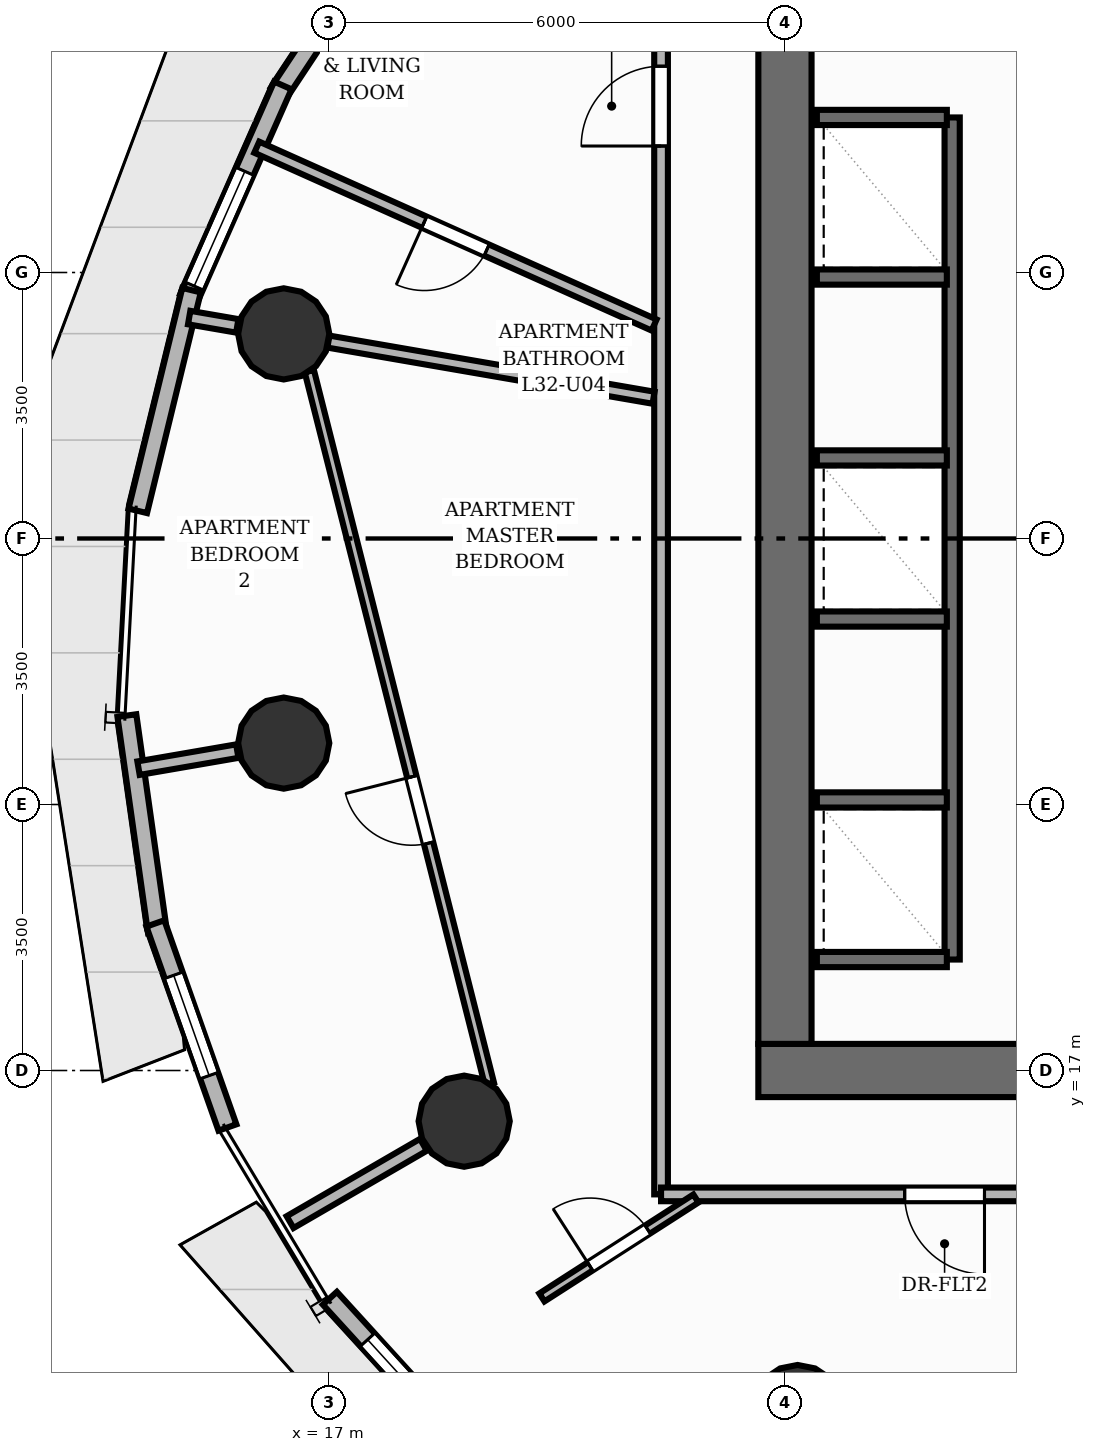
"""IFC4 building model, lengths in metres.
Left out: names, types, materials, properties, quantities, classifications, styles, units other than length and angle.
Written with IfcOpenShell. Run it as: python <this file> out.ifc"""

import sys

from ifc_helpers import new_model, si_unit, direction, frame, frame_2d, origin, origin_2d, place, context, subcontext, project, spatial, rectangle, circle, extrude, element, fill, save


model = new_model("IFC4")
c1 = context("Model", 3, precision=1e-05, world=origin(), true_north=direction((0.0, 1.0)))
c2 = subcontext(c1, "Body", "Model", "MODEL_VIEW")
j1 = project(units=[si_unit("LENGTHUNIT", "METRE"), si_unit("PLANEANGLEUNIT", "RADIAN")], contexts=[c1])
p1 = place(None, origin())
s1 = spatial("IfcSite", under=j1, at=p1, CompositionType="ELEMENT")
p2 = place(p1, origin())
s2 = spatial("IfcBuilding", under=s1, at=p2, CompositionType="ELEMENT")
p3 = place(p2, frame((0.0, 0.0, 109.28)))
s3 = spatial("IfcBuildingStorey", under=s2, at=p3, CompositionType="ELEMENT", Elevation=109.28)
p4 = place(p3, frame((22.65, 17.0, 0.0), z_axis=(0.0, 0.0, 1.0), x_axis=(1.0, 0.0, 0.0)))
e1 = element("IfcWall", 1, at=p4, inside=s3, PredefinedType="SHEAR", context=c2, shape_type="SweptSolid", body=[
    extrude(rectangle(XDim=18.7, YDim=0.7, at=frame_2d((9.35, 0.0))), origin(), (0.0, 0.0, 1.0), 3.2),
])
p5 = place(p4, frame((5.85, 0.0, 0.0)))
e2 = element("IfcOpeningElement", 2, at=p5, cuts=e1, PredefinedType="OPENING", context=c2, shape_type="SweptSolid", body=[
    extrude(rectangle(XDim=1.1, YDim=2.15, at=frame_2d((0.55, 1.075))), frame((0.0, 0.36, 0.0), z_axis=(0.0, -1.0, 0.0), x_axis=(1.0, 0.0, 0.0)), (0.0, 0.0, 1.0), 0.72),
])
p6 = place(p4, frame((9.4, 0.0, 0.0)))
e3 = element("IfcOpeningElement", 3, at=p6, cuts=e1, PredefinedType="OPENING", context=c2, shape_type="SweptSolid", body=[
    extrude(rectangle(XDim=0.9, YDim=2.0, at=frame_2d((0.45, 1.0))), frame((0.0, 0.36, 0.0), z_axis=(0.0, -1.0, 0.0), x_axis=(1.0, 0.0, 0.0)), (0.0, 0.0, 1.0), 0.72),
])
p7 = place(p3, frame((23.0, 17.35, 0.0), z_axis=(0.0, 0.0, 1.0), x_axis=(0.0, 1.0, 0.0)))
e4 = element("IfcWall", 4, at=p7, inside=s3, PredefinedType="SHEAR", context=c2, shape_type="SweptSolid", body=[
    extrude(rectangle(XDim=13.3, YDim=0.7, at=frame_2d((6.65, 0.0))), origin(), (0.0, 0.0, 1.0), 3.2),
])
for number, where, z_axis, x_axis in (
    (5, (16.406, 26.692, 0.0), (0.0, 0.0, 1.0), (1.0, 0.0, 0.0)),
    (6, (16.406, 21.308, 0.0), (0.0, 0.0, 1.0), (1.0, 0.0, 0.0)),
    (7, (18.78, 16.333, 0.0), (0.0, 0.0, 1.0), (1.0, 0.0, 0.0)),
    (8, (23.167, 12.526, 0.0), (0.0, 0.0, 1.0), (1.0, 0.0, 0.0)),
):
    element("IfcColumn", number, at=place(p3, frame(where, z_axis=z_axis, x_axis=x_axis)), inside=s3, PredefinedType="COLUMN", context=c2, shape_type="SweptSolid", body=[
        extrude(circle(Radius=0.6, at=origin_2d()), origin(), (0.0, 0.0, 1.0), 3.2),
    ])
p8 = place(p3, frame((16.341, 29.864, 0.0), z_axis=(0.0, 0.0, 1.0), x_axis=(0.552034347266, 0.833821371421, 0.0)))
e9 = element("IfcWall", 9, at=p8, inside=s3, PredefinedType="SOLIDWALL", context=c2, shape_type="SweptSolid", body=[
    extrude(rectangle(XDim=3.131, YDim=0.25, at=frame_2d((1.565, 0.0))), origin(), (0.0, 0.0, 1.0), 2.8),
])
p9 = place(p3, frame((15.157, 27.162, 0.0), z_axis=(0.0, 0.0, 1.0), x_axis=(0.404109525311, 0.914710605357, 0.0)))
e10 = element("IfcWall", 10, at=p9, inside=s3, PredefinedType="SOLIDWALL", context=c2, shape_type="SweptSolid", body=[
    extrude(rectangle(XDim=3.061, YDim=0.25, at=frame_2d((1.53, 0.0))), origin(), (0.0, 0.0, 1.0), 2.8),
])
p10 = place(p9, frame((0.175, 0.0, 0.85)))
e11 = element("IfcOpeningElement", 11, at=p10, cuts=e10, PredefinedType="OPENING", context=c2, shape_type="SweptSolid", body=[
    extrude(rectangle(XDim=1.65, YDim=1.55, at=frame_2d((0.825, 0.775))), frame((0.0, 0.135, 0.0), z_axis=(0.0, -1.0, 0.0), x_axis=(1.0, 0.0, 0.0)), (0.0, 0.0, 1.0), 0.27),
])
p11 = place(p3, frame((14.486, 24.364, 0.0), z_axis=(0.0, 0.0, 1.0), x_axis=(0.236668427837, 0.971590477138, 0.0)))
e12 = element("IfcWall", 12, at=p11, inside=s3, PredefinedType="SOLIDWALL", context=c2, shape_type="SweptSolid", body=[
    extrude(rectangle(XDim=2.989, YDim=0.25, at=frame_2d((1.494, 0.0))), origin(), (0.0, 0.0, 1.0), 2.8),
])
p12 = place(p3, frame((14.744, 18.824, 0.0), z_axis=(0.0, 0.0, 1.0), x_axis=(-0.139982311006, 0.990154004489, 0.0)))
e13 = element("IfcWall", 13, at=p12, inside=s3, PredefinedType="SOLIDWALL", context=c2, shape_type="SweptSolid", body=[
    extrude(rectangle(XDim=2.874, YDim=0.25, at=frame_2d((1.437, 0.0))), origin(), (0.0, 0.0, 1.0), 2.8),
])
p13 = place(p3, frame((15.665, 16.25, 0.0), z_axis=(0.0, 0.0, 1.0), x_axis=(-0.332923265962, 0.942953921982, 0.0)))
e14 = element("IfcWall", 14, at=p13, inside=s3, PredefinedType="SOLIDWALL", context=c2, shape_type="SweptSolid", body=[
    extrude(rectangle(XDim=2.847, YDim=0.25, at=frame_2d((1.424, 0.0))), origin(), (0.0, 0.0, 1.0), 2.8),
])
p14 = place(p13, frame((0.724, 0.0, 0.85)))
e15 = element("IfcOpeningElement", 15, at=p14, cuts=e14, PredefinedType="OPENING", context=c2, shape_type="SweptSolid", body=[
    extrude(rectangle(XDim=1.4, YDim=1.55, at=frame_2d((0.7, 0.775))), frame((0.0, 0.135, 0.0), z_axis=(0.0, -1.0, 0.0), x_axis=(1.0, 0.0, 0.0)), (0.0, 0.0, 1.0), 0.27),
])
p15 = place(p3, frame((18.949, 11.879, 0.0), z_axis=(0.0, 0.0, 1.0), x_axis=(-0.673691100196, 0.739013059098, 0.0)))
e16 = element("IfcWall", 16, at=p15, inside=s3, PredefinedType="SOLIDWALL", context=c2, shape_type="SweptSolid", body=[
    extrude(rectangle(XDim=2.874, YDim=0.25, at=frame_2d((1.437, 0.0))), origin(), (0.0, 0.0, 1.0), 2.8),
])
p16 = place(p15, frame((0.737, 0.0, 0.85)))
e17 = element("IfcOpeningElement", 17, at=p16, cuts=e16, PredefinedType="OPENING", context=c2, shape_type="SweptSolid", body=[
    extrude(rectangle(XDim=1.4, YDim=1.55, at=frame_2d((0.7, 0.775))), frame((0.0, 0.135, 0.0), z_axis=(0.0, -1.0, 0.0), x_axis=(1.0, 0.0, 0.0)), (0.0, 0.0, 1.0), 0.27),
])
p17 = place(p3, frame((25.2, 18.46, 0.0), z_axis=(0.0, 0.0, 1.0), x_axis=(0.0, 1.0, 0.0)))
e18 = element("IfcWall", 18, at=p17, inside=s3, PredefinedType="SHEAR", context=c2, shape_type="SweptSolid", body=[
    extrude(rectangle(XDim=11.08, YDim=0.2, at=frame_2d((5.54, 0.0))), origin(), (0.0, 0.0, 1.0), 3.2),
])
for number, where, z_axis, x_axis in (
    (19, (23.42, 18.46, 0.0), (0.0, 0.0, 1.0), (1.0, 0.0, 0.0)),
    (20, (23.42, 29.54, 0.0), (0.0, 0.0, 1.0), (1.0, 0.0, 0.0)),
    (21, (23.42, 20.56, 0.0), (0.0, 0.0, 1.0), (1.0, 0.0, 0.0)),
    (22, (23.42, 22.94, 0.0), (0.0, 0.0, 1.0), (1.0, 0.0, 0.0)),
    (23, (23.42, 25.06, 0.0), (0.0, 0.0, 1.0), (1.0, 0.0, 0.0)),
    (24, (23.42, 27.44, 0.0), (0.0, 0.0, 1.0), (1.0, 0.0, 0.0)),
):
    element("IfcWall", number, at=place(p3, frame(where, z_axis=z_axis, x_axis=x_axis)), inside=s3, PredefinedType="SHEAR", context=c2, shape_type="SweptSolid", body=[
        extrude(rectangle(XDim=1.71, YDim=0.2, at=frame_2d((0.855, 0.0))), origin(), (0.0, 0.0, 1.0), 3.2),
    ])
p18 = place(p3, frame((15.794, 26.798, 0.0), z_axis=(0.0, 0.0, 1.0), x_axis=(-0.985389793052, 0.170314285219, 0.0)))
e25 = element("IfcWall", 25, at=p18, inside=s3, PredefinedType="PARTITIONING", context=c2, shape_type="SweptSolid", body=[
    extrude(rectangle(XDim=0.642, YDim=0.18, at=frame_2d((0.321, 0.0))), origin(), (0.0, 0.0, 1.0), 2.1),
])
p19 = place(p3, frame((15.794, 21.202, 0.0), z_axis=(0.0, 0.0, 1.0), x_axis=(-0.98541625201, -0.170161130326, 0.0)))
e26 = element("IfcWall", 26, at=p19, inside=s3, PredefinedType="PARTITIONING", context=c2, shape_type="SweptSolid", body=[
    extrude(rectangle(XDim=1.319, YDim=0.18, at=frame_2d((0.659, 0.0))), origin(), (0.0, 0.0, 1.0), 2.1),
])
p20 = place(p3, frame((18.243, 16.022, 0.0), z_axis=(0.0, 0.0, 1.0), x_axis=(-0.865046864493, -0.501691062539, 0.0)))
e27 = element("IfcWall", 27, at=p20, inside=s3, PredefinedType="PARTITIONING", context=c2, shape_type="SweptSolid", body=[
    extrude(rectangle(XDim=2.028, YDim=0.18, at=frame_2d((1.014, 0.0))), origin(), (0.0, 0.0, 1.0), 2.1),
])
p21 = place(p3, frame((21.37, 15.37, 0.0), z_axis=(0.0, 0.0, 1.0), x_axis=(0.0, 1.0, 0.0)))
e28 = element("IfcWall", 28, at=p21, inside=s3, PredefinedType="PARTITIONING", context=c2, shape_type="SweptSolid", body=[
    extrude(rectangle(XDim=17.26, YDim=0.18, at=frame_2d((8.63, 0.0))), origin(), (0.0, 0.0, 1.0), 2.795),
])
p22 = place(p21, frame((13.794, 0.0, 0.0)))
e29 = element("IfcOpeningElement", 29, at=p22, cuts=e28, PredefinedType="OPENING", context=c2, shape_type="SweptSolid", body=[
    extrude(rectangle(XDim=1.05, YDim=2.0, at=frame_2d((0.525, 1.0))), frame((0.0, 0.1, 0.0), z_axis=(0.0, -1.0, 0.0), x_axis=(1.0, 0.0, 0.0)), (0.0, 0.0, 1.0), 0.2),
])
p23 = place(p3, frame((28.325, 15.37, 0.0), z_axis=(0.0, 0.0, 1.0), x_axis=(-1.0, 0.0, 0.0)))
e30 = element("IfcWall", 30, at=p23, inside=s3, PredefinedType="PARTITIONING", context=c2, shape_type="SweptSolid", body=[
    extrude(rectangle(XDim=6.955, YDim=0.18, at=frame_2d((3.478, 0.0))), origin(), (0.0, 0.0, 1.0), 2.795),
])
p24 = place(p23, frame((2.7, 0.0, 0.0)))
e31 = element("IfcOpeningElement", 31, at=p24, cuts=e30, PredefinedType="OPENING", context=c2, shape_type="SweptSolid", body=[
    extrude(rectangle(XDim=1.05, YDim=2.0, at=frame_2d((0.525, 1.0))), frame((0.0, 0.1, 0.0), z_axis=(0.0, -1.0, 0.0), x_axis=(1.0, 0.0, 0.0)), (0.0, 0.0, 1.0), 0.2),
])
p25 = place(p3, frame((21.279, 26.809, 0.0), z_axis=(0.0, 0.0, 1.0), x_axis=(-0.912794415037, 0.408419338275, 0.0)))
e32 = element("IfcWall", 32, at=p25, inside=s3, PredefinedType="PLUMBINGWALL", context=c2, shape_type="SweptSolid", body=[
    extrude(rectangle(XDim=5.727, YDim=0.16, at=frame_2d((2.864, 0.0))), origin(), (0.0, 0.0, 1.0), 2.481),
])
p26 = place(p25, frame((2.414, 0.0, 0.0)))
e33 = element("IfcOpeningElement", 33, at=p26, cuts=e32, PredefinedType="OPENING", context=c2, shape_type="SweptSolid", body=[
    extrude(rectangle(XDim=0.9, YDim=2.1, at=frame_2d((0.45, 1.05))), frame((0.0, 0.09, 0.0), z_axis=(0.0, -1.0, 0.0), x_axis=(1.0, 0.0, 0.0)), (0.0, 0.0, 1.0), 0.18),
])
p27 = place(p3, frame((21.271, 25.852, 0.0), z_axis=(0.0, 0.0, 1.0), x_axis=(-0.985414949705, 0.170168671906, 0.0)))
e34 = element("IfcWall", 34, at=p27, inside=s3, PredefinedType="PLUMBINGWALL", context=c2, shape_type="SweptSolid", body=[
    extrude(rectangle(XDim=4.341, YDim=0.16, at=frame_2d((2.171, 0.0))), origin(), (0.0, 0.0, 1.0), 2.1),
])
p28 = place(p3, frame((19.802, 14.014, 0.0), z_axis=(0.0, 0.0, 1.0), x_axis=(0.841349696578, 0.540491154477, 0.0)))
e35 = element("IfcWall", 35, at=p28, inside=s3, PredefinedType="PARTITIONING", context=c2, shape_type="SweptSolid", body=[
    extrude(rectangle(XDim=2.408, YDim=0.125, at=frame_2d((1.204, 0.0))), origin(), (0.0, 0.0, 1.0), 2.795),
])
p29 = place(p28, frame((0.754, 0.0, 0.0)))
e36 = element("IfcOpeningElement", 36, at=p29, cuts=e35, PredefinedType="OPENING", context=c2, shape_type="SweptSolid", body=[
    extrude(rectangle(XDim=0.9, YDim=2.1, at=frame_2d((0.45, 1.05))), frame((0.0, 0.073, 0.0), z_axis=(0.0, -1.0, 0.0), x_axis=(1.0, 0.0, 0.0)), (0.0, 0.0, 1.0), 0.145),
])
p30 = place(p3, frame((19.111, 16.826, 0.0), z_axis=(0.0, 0.0, 1.0), x_axis=(-0.244982180272, 0.969527581531, 0.0)))
e37 = element("IfcWall", 37, at=p30, inside=s3, PredefinedType="PARTITIONING", context=c2, shape_type="SweptSolid", body=[
    extrude(rectangle(XDim=9.671, YDim=0.125, at=frame_2d((4.835, 0.0))), origin(), (0.0, 0.0, 1.0), 2.795),
])
p31 = place(p30, frame((3.265, 0.0, 0.0)))
e38 = element("IfcOpeningElement", 38, at=p31, cuts=e37, PredefinedType="OPENING", context=c2, shape_type="SweptSolid", body=[
    extrude(rectangle(XDim=0.9, YDim=2.1, at=frame_2d((0.45, 1.05))), frame((0.0, 0.073, 0.0), z_axis=(0.0, -1.0, 0.0), x_axis=(1.0, 0.0, 0.0)), (0.0, 0.0, 1.0), 0.145),
])
p32 = place(p10, origin())
e39 = element("IfcWindow", 39, at=p32, inside=s3, PartitioningType="SINGLE_PANEL", PredefinedType="WINDOW", context=c2, shape_type="SweptSolid", body=[
    extrude(rectangle(XDim=1.65, YDim=1.55, at=frame_2d((0.825, 0.775))), frame((0.0, 0.03, 0.0), z_axis=(0.0, -1.0, 0.0), x_axis=(1.0, 0.0, 0.0)), (0.0, 0.0, 1.0), 0.06),
])
fill(e11, e39)
p33 = place(p14, origin())
e40 = element("IfcWindow", 40, at=p33, inside=s3, PartitioningType="SINGLE_PANEL", PredefinedType="WINDOW", context=c2, shape_type="SweptSolid", body=[
    extrude(rectangle(XDim=1.4, YDim=1.55, at=frame_2d((0.7, 0.775))), frame((0.0, 0.03, 0.0), z_axis=(0.0, -1.0, 0.0), x_axis=(1.0, 0.0, 0.0)), (0.0, 0.0, 1.0), 0.06),
])
fill(e15, e40)
p34 = place(p16, origin())
e41 = element("IfcWindow", 41, at=p34, inside=s3, PartitioningType="SINGLE_PANEL", PredefinedType="WINDOW", context=c2, shape_type="SweptSolid", body=[
    extrude(rectangle(XDim=1.4, YDim=1.55, at=frame_2d((0.7, 0.775))), frame((0.0, 0.03, 0.0), z_axis=(0.0, -1.0, 0.0), x_axis=(1.0, 0.0, 0.0)), (0.0, 0.0, 1.0), 0.06),
])
fill(e17, e41)
p35 = place(p22, origin())
e42 = element("IfcDoor", 42, at=p35, inside=s3, OperationType="SINGLE_SWING_LEFT", PredefinedType="DOOR", context=c2, shape_type="SweptSolid", body=[
    extrude(rectangle(XDim=1.05, YDim=2.0, at=frame_2d((0.525, 1.0))), frame((0.0, 0.025, 0.0), z_axis=(0.0, -1.0, 0.0), x_axis=(1.0, 0.0, 0.0)), (0.0, 0.0, 1.0), 0.05),
])
fill(e29, e42)
p36 = place(p26, origin())
e43 = element("IfcDoor", 43, at=p36, inside=s3, OperationType="SINGLE_SWING_RIGHT", PredefinedType="DOOR", context=c2, shape_type="SweptSolid", body=[
    extrude(rectangle(XDim=0.9, YDim=2.1, at=frame_2d((0.45, 1.05))), frame((0.0, 0.025, 0.0), z_axis=(0.0, -1.0, 0.0), x_axis=(1.0, 0.0, 0.0)), (0.0, 0.0, 1.0), 0.05),
])
fill(e33, e43)
p37 = place(p24, origin())
e44 = element("IfcDoor", 44, at=p37, inside=s3, OperationType="SINGLE_SWING_LEFT", PredefinedType="DOOR", context=c2, shape_type="SweptSolid", body=[
    extrude(rectangle(XDim=1.05, YDim=2.0, at=frame_2d((0.525, 1.0))), frame((0.0, 0.025, 0.0), z_axis=(0.0, -1.0, 0.0), x_axis=(1.0, 0.0, 0.0)), (0.0, 0.0, 1.0), 0.05),
])
fill(e31, e44)
p38 = place(p29, origin())
e45 = element("IfcDoor", 45, at=p38, inside=s3, OperationType="SINGLE_SWING_LEFT", PredefinedType="DOOR", context=c2, shape_type="SweptSolid", body=[
    extrude(rectangle(XDim=0.9, YDim=2.1, at=frame_2d((0.45, 1.05))), frame((0.0, 0.025, 0.0), z_axis=(0.0, -1.0, 0.0), x_axis=(1.0, 0.0, 0.0)), (0.0, 0.0, 1.0), 0.05),
])
fill(e36, e45)
p39 = place(p31, origin())
e46 = element("IfcDoor", 46, at=p39, inside=s3, OperationType="SINGLE_SWING_RIGHT", PredefinedType="DOOR", context=c2, shape_type="SweptSolid", body=[
    extrude(rectangle(XDim=0.9, YDim=2.1, at=frame_2d((0.45, 1.05))), frame((0.0, 0.025, 0.0), z_axis=(0.0, -1.0, 0.0), x_axis=(1.0, 0.0, 0.0)), (0.0, 0.0, 1.0), 0.05),
])
fill(e38, e46)
save(model, sys.argv[1])
